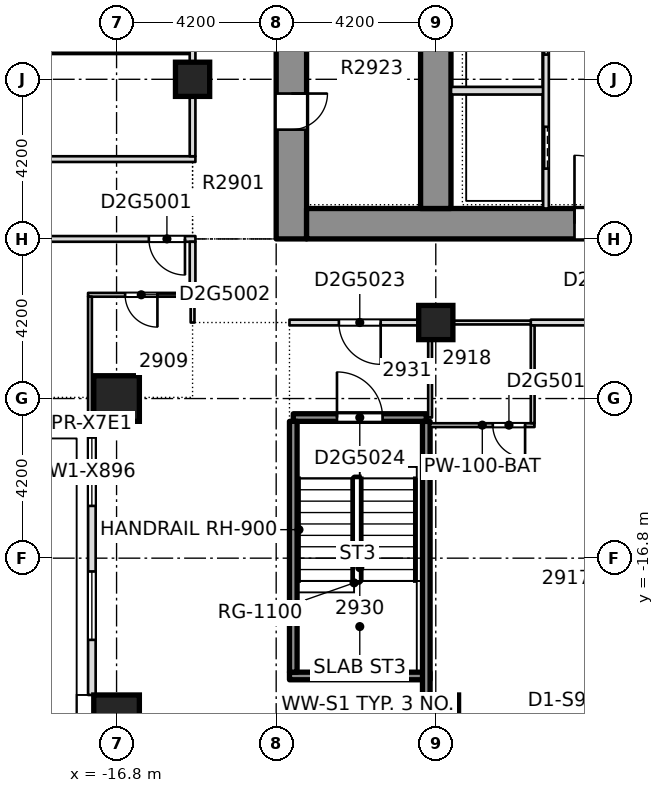
"""IFC4 building model, lengths in metres.
Left out: names, types, materials, properties, quantities, classifications, styles, units other than length and angle.
Written with IfcOpenShell. Run it as: python <this file> out.ifc"""

import sys

from ifc_helpers import new_model, si_unit, direction, frame, frame_2d, origin, origin_2d, place, context, subcontext, project, spatial, rectangle, extrude, element, fill, save


model = new_model("IFC4")
c1 = context("Model", 3, precision=1e-05, world=origin(), true_north=direction((0.0, 1.0)))
c2 = subcontext(c1, "Body", "Model", "MODEL_VIEW")
j1 = project(units=[si_unit("LENGTHUNIT", "METRE"), si_unit("PLANEANGLEUNIT", "RADIAN")], contexts=[c1])
p1 = place(None, origin())
s1 = spatial("IfcSite", under=j1, at=p1, CompositionType="ELEMENT")
p2 = place(p1, origin())
s2 = spatial("IfcBuilding", under=s1, at=p2, CompositionType="ELEMENT")
p3 = place(p2, frame((0.0, 0.0, 114.9)))
s3 = spatial("IfcBuildingStorey", under=s2, at=p3, CompositionType="ELEMENT", Elevation=114.9)
p4 = place(p3, frame((-12.2, -8.4, -0.32), z_axis=(0.0, 0.0, 1.0), x_axis=(0.0, 1.0, 0.0)))
e1 = element("IfcWall", 1, at=p4, inside=s3, PredefinedType="SHEAR", context=c2, shape_type="SweptSolid", body=[
    extrude(rectangle(XDim=30.15, YDim=0.8, at=frame_2d((15.075, 0.0))), origin(), (0.0, 0.0, 1.0), 3.45),
])
p5 = place(p4, frame((2.875, 0.0, 0.32)))
e2 = element("IfcOpeningElement", 2, at=p5, cuts=e1, PredefinedType="OPENING", context=c2, shape_type="SweptSolid", body=[
    extrude(rectangle(XDim=0.95, YDim=2.1, at=frame_2d((0.475, 1.05))), frame((0.0, 0.41, 0.0), z_axis=(0.0, -1.0, 0.0), x_axis=(1.0, 0.0, 0.0)), (0.0, 0.0, 1.0), 0.82),
])
p6 = place(p4, frame((6.575, 0.0, 0.32)))
e3 = element("IfcOpeningElement", 3, at=p6, cuts=e1, PredefinedType="OPENING", context=c2, shape_type="SweptSolid", body=[
    extrude(rectangle(XDim=0.95, YDim=2.1, at=frame_2d((0.475, 1.05))), frame((0.0, 0.41, 0.0), z_axis=(0.0, -1.0, 0.0), x_axis=(1.0, 0.0, 0.0)), (0.0, 0.0, 1.0), 0.82),
])
p7 = place(p4, frame((9.425, 0.0, 0.32)))
e4 = element("IfcOpeningElement", 4, at=p7, cuts=e1, PredefinedType="OPENING", context=c2, shape_type="SweptSolid", body=[
    extrude(rectangle(XDim=0.95, YDim=2.1, at=frame_2d((0.475, 1.05))), frame((0.0, 0.41, 0.0), z_axis=(0.0, -1.0, 0.0), x_axis=(1.0, 0.0, 0.0)), (0.0, 0.0, 1.0), 0.82),
])
p8 = place(p4, frame((13.225, 0.0, 0.32)))
e5 = element("IfcOpeningElement", 5, at=p8, cuts=e1, PredefinedType="OPENING", context=c2, shape_type="SweptSolid", body=[
    extrude(rectangle(XDim=0.95, YDim=2.1, at=frame_2d((0.475, 1.05))), frame((0.0, 0.41, 0.0), z_axis=(0.0, -1.0, 0.0), x_axis=(1.0, 0.0, 0.0)), (0.0, 0.0, 1.0), 0.82),
])
p9 = place(p4, frame((16.775, 0.0, 0.32)))
e6 = element("IfcOpeningElement", 6, at=p9, cuts=e1, PredefinedType="OPENING", context=c2, shape_type="SweptSolid", body=[
    extrude(rectangle(XDim=0.95, YDim=2.1, at=frame_2d((0.475, 1.05))), frame((0.0, 0.41, 0.0), z_axis=(0.0, -1.0, 0.0), x_axis=(1.0, 0.0, 0.0)), (0.0, 0.0, 1.0), 0.82),
])
p10 = place(p4, frame((24.75, 0.0, 0.32)))
e7 = element("IfcOpeningElement", 7, at=p10, cuts=e1, PredefinedType="OPENING", context=c2, shape_type="SweptSolid", body=[
    extrude(rectangle(XDim=0.95, YDim=2.1, at=frame_2d((0.475, 1.05))), frame((0.0, 0.41, 0.0), z_axis=(0.0, -1.0, 0.0), x_axis=(1.0, 0.0, 0.0)), (0.0, 0.0, 1.0), 0.82),
])
p11 = place(p4, frame((19.3, 0.0, 0.32)))
e8 = element("IfcOpeningElement", 8, at=p11, cuts=e1, PredefinedType="OPENING", context=c2, shape_type="SweptSolid", body=[
    extrude(rectangle(XDim=1.2, YDim=2.1, at=frame_2d((0.6, 1.05))), frame((0.0, 0.41, 0.0), z_axis=(0.0, -1.0, 0.0), x_axis=(1.0, 0.0, 0.0)), (0.0, 0.0, 1.0), 0.82),
])
p12 = place(p3, frame((-11.8, -8.0, -0.32), z_axis=(0.0, 0.0, 1.0), x_axis=(1.0, 0.0, 0.0)))
e9 = element("IfcWall", 9, at=p12, inside=s3, PredefinedType="SHEAR", context=c2, shape_type="SweptSolid", body=[
    extrude(rectangle(XDim=23.6, YDim=0.8, at=frame_2d((11.8, 0.0))), origin(), (0.0, 0.0, 1.0), 3.45),
])
p13 = place(p12, frame((7.05, 0.0, 0.32)))
e10 = element("IfcOpeningElement", 10, at=p13, cuts=e9, PredefinedType="OPENING", context=c2, shape_type="SweptSolid", body=[
    extrude(rectangle(XDim=1.8, YDim=2.1, at=frame_2d((0.9, 1.05))), frame((0.0, 0.41, 0.0), z_axis=(0.0, -1.0, 0.0), x_axis=(1.0, 0.0, 0.0)), (0.0, 0.0, 1.0), 0.82),
])
p14 = place(p12, frame((14.75, 0.0, 0.32)))
e11 = element("IfcOpeningElement", 11, at=p14, cuts=e9, PredefinedType="OPENING", context=c2, shape_type="SweptSolid", body=[
    extrude(rectangle(XDim=1.8, YDim=2.1, at=frame_2d((0.9, 1.05))), frame((0.0, 0.41, 0.0), z_axis=(0.0, -1.0, 0.0), x_axis=(1.0, 0.0, 0.0)), (0.0, 0.0, 1.0), 0.82),
])
p15 = place(p3, frame((-8.4, -7.6, -0.32), z_axis=(0.0, 0.0, 1.0), x_axis=(0.0, 1.0, 0.0)))
e12 = element("IfcWall", 12, at=p15, inside=s3, PredefinedType="SHEAR", context=c2, shape_type="SweptSolid", body=[
    extrude(rectangle(XDim=28.55, YDim=0.8, at=frame_2d((14.275, 0.0))), origin(), (0.0, 0.0, 1.0), 3.45),
])
p16 = place(p15, frame((18.5, 0.0, 0.32)))
e13 = element("IfcOpeningElement", 13, at=p16, cuts=e12, PredefinedType="OPENING", context=c2, shape_type="SweptSolid", body=[
    extrude(rectangle(XDim=1.2, YDim=2.1, at=frame_2d((0.6, 1.05))), frame((0.0, 0.41, 0.0), z_axis=(0.0, -1.0, 0.0), x_axis=(1.0, 0.0, 0.0)), (0.0, 0.0, 1.0), 0.82),
])
for number, where, z_axis, x_axis in (
    (14, (-16.8, -21.0, -0.32), (0.0, 0.0, 1.0), (1.0, 0.0, 0.0)),
    (15, (-8.4, -21.0, -0.32), (0.0, 0.0, 1.0), (1.0, 0.0, 0.0)),
    (16, (-16.8, -12.6, -0.32), (0.0, 0.0, 1.0), (1.0, 0.0, 0.0)),
):
    element("IfcColumn", number, at=place(p3, frame(where, z_axis=z_axis, x_axis=x_axis)), inside=s3, PredefinedType="COLUMN", context=c2, shape_type="SweptSolid", body=[
        extrude(rectangle(XDim=1.2, YDim=1.2, at=origin_2d()), origin(), (0.0, 0.0, 1.0), 3.45),
    ])
for number, where, z_axis, x_axis in (
    (17, (-8.4, -10.6, -0.32), (0.0, 0.0, 1.0), (1.0, 0.0, 0.0)),
    (18, (-14.8, -4.2, -0.32), (0.0, 0.0, 1.0), (1.0, 0.0, 0.0)),
):
    element("IfcColumn", number, at=place(p3, frame(where, z_axis=z_axis, x_axis=x_axis)), inside=s3, PredefinedType="COLUMN", context=c2, shape_type="SweptSolid", body=[
        extrude(rectangle(XDim=0.9, YDim=0.9, at=origin_2d()), origin(), (0.0, 0.0, 1.0), 3.45),
    ])
p17 = place(p3, frame((-8.55, -13.3, 0.0), z_axis=(0.0, 0.0, 1.0), x_axis=(1.0, 0.0, 0.0)))
e19 = element("IfcWall", 19, at=p17, inside=s3, PredefinedType="PARTITIONING", context=c2, shape_type="SweptSolid", body=[
    extrude(rectangle(XDim=2.748, YDim=0.1, at=frame_2d((1.374, 0.0))), origin(), (0.0, 0.0, 1.0), 3.13),
])
p18 = place(p17, frame((1.65, 0.0, 0.0)))
e20 = element("IfcOpeningElement", 20, at=p18, cuts=e19, PredefinedType="OPENING", context=c2, shape_type="SweptSolid", body=[
    extrude(rectangle(XDim=0.85, YDim=2.1, at=frame_2d((0.425, 1.05))), frame((0.0, 0.06, 0.0), z_axis=(0.0, -1.0, 0.0), x_axis=(1.0, 0.0, 0.0)), (0.0, 0.0, 1.0), 0.12),
])
p19 = place(p3, frame((-12.15, -13.1, 0.0), z_axis=(0.0, 0.0, 1.0), x_axis=(1.0, 0.0, 0.0)))
e21 = element("IfcWall", 21, at=p19, inside=s3, PredefinedType="SOLIDWALL", context=c2, shape_type="SweptSolid", body=[
    extrude(rectangle(XDim=3.5, YDim=0.2, at=frame_2d((1.75, 0.0))), origin(), (0.0, 0.0, 1.0), 3.13),
])
p20 = place(p19, frame((1.15, 0.0, 0.0)))
e22 = element("IfcOpeningElement", 22, at=p20, cuts=e21, PredefinedType="OPENING", context=c2, shape_type="SweptSolid", body=[
    extrude(rectangle(XDim=1.2, YDim=2.1, at=frame_2d((0.6, 1.05))), frame((0.0, 0.11, 0.0), z_axis=(0.0, -1.0, 0.0), x_axis=(1.0, 0.0, 0.0)), (0.0, 0.0, 1.0), 0.22),
])
p21 = place(p3, frame((-12.25, -10.6, 0.0), z_axis=(0.0, 0.0, 1.0), x_axis=(1.0, 0.0, 0.0)))
e23 = element("IfcWall", 23, at=p21, inside=s3, PredefinedType="PARTITIONING", context=c2, shape_type="SweptSolid", body=[
    extrude(rectangle(XDim=3.75, YDim=0.15, at=frame_2d((1.875, 0.0))), origin(), (0.0, 0.0, 1.0), 3.13),
])
p22 = place(p21, frame((1.3, 0.0, 0.0)))
e24 = element("IfcOpeningElement", 24, at=p22, cuts=e23, PredefinedType="OPENING", context=c2, shape_type="SweptSolid", body=[
    extrude(rectangle(XDim=1.1, YDim=2.1, at=frame_2d((0.55, 1.05))), frame((0.0, 0.085, 0.0), z_axis=(0.0, -1.0, 0.0), x_axis=(1.0, 0.0, 0.0)), (0.0, 0.0, 1.0), 0.17),
])
p23 = place(p3, frame((-8.6, -10.6, 0.0), z_axis=(0.0, 0.0, 1.0), x_axis=(1.0, 0.0, 0.0)))
e25 = element("IfcWall", 25, at=p23, inside=s3, PredefinedType="PARTITIONING", context=c2, shape_type="SweptSolid", body=[
    extrude(rectangle(XDim=2.8, YDim=0.1, at=frame_2d((1.4, 0.0))), origin(), (0.0, 0.0, 1.0), 3.13),
])
p24 = place(p3, frame((-5.9, -10.6, 0.0), z_axis=(0.0, 0.0, 1.0), x_axis=(1.0, 0.0, 0.0)))
e26 = element("IfcWall", 26, at=p24, inside=s3, PredefinedType="PARTITIONING", context=c2, shape_type="SweptSolid", body=[
    extrude(rectangle(XDim=7.8, YDim=0.15, at=frame_2d((3.9, 0.0))), origin(), (0.0, 0.0, 1.0), 3.13),
])
p25 = place(p24, frame((1.575, 0.0, 0.0)))
e27 = element("IfcOpeningElement", 27, at=p25, cuts=e26, PredefinedType="OPENING", context=c2, shape_type="SweptSolid", body=[
    extrude(rectangle(XDim=0.95, YDim=2.1, at=frame_2d((0.475, 1.05))), frame((0.0, 0.085, 0.0), z_axis=(0.0, -1.0, 0.0), x_axis=(1.0, 0.0, 0.0)), (0.0, 0.0, 1.0), 0.17),
])
p26 = place(p24, frame((6.45, 0.0, 0.0)))
e28 = element("IfcOpeningElement", 28, at=p26, cuts=e26, PredefinedType="OPENING", context=c2, shape_type="SweptSolid", body=[
    extrude(rectangle(XDim=1.1, YDim=2.1, at=frame_2d((0.55, 1.05))), frame((0.0, 0.085, 0.0), z_axis=(0.0, -1.0, 0.0), x_axis=(1.0, 0.0, 0.0)), (0.0, 0.0, 1.0), 0.17),
])
p27 = place(p3, frame((-17.55, -9.87, 0.0), z_axis=(0.0, 0.0, 1.0), x_axis=(1.0, 0.0, 0.0)))
e29 = element("IfcWall", 29, at=p27, inside=s3, PredefinedType="PARTITIONING", context=c2, shape_type="SweptSolid", body=[
    extrude(rectangle(XDim=2.825, YDim=0.1, at=frame_2d((1.413, 0.0))), origin(), (0.0, 0.0, 1.0), 3.13),
])
p28 = place(p27, frame((0.975, 0.0, 0.0)))
e30 = element("IfcOpeningElement", 30, at=p28, cuts=e29, PredefinedType="OPENING", context=c2, shape_type="SweptSolid", body=[
    extrude(rectangle(XDim=0.85, YDim=2.1, at=frame_2d((0.425, 1.05))), frame((0.0, 0.06, 0.0), z_axis=(0.0, -1.0, 0.0), x_axis=(1.0, 0.0, 0.0)), (0.0, 0.0, 1.0), 0.12),
])
p29 = place(p3, frame((-25.75, -8.4, 0.0), z_axis=(0.0, 0.0, 1.0), x_axis=(1.0, 0.0, 0.0)))
e31 = element("IfcWall", 31, at=p29, inside=s3, PredefinedType="PARTITIONING", context=c2, shape_type="SweptSolid", body=[
    extrude(rectangle(XDim=11.025, YDim=0.15, at=frame_2d((5.512, 0.0))), origin(), (0.0, 0.0, 1.0), 3.13),
])
p30 = place(p29, frame((9.8, 0.0, 0.0)))
e32 = element("IfcOpeningElement", 32, at=p30, cuts=e31, PredefinedType="OPENING", context=c2, shape_type="SweptSolid", body=[
    extrude(rectangle(XDim=0.95, YDim=2.1, at=frame_2d((0.475, 1.05))), frame((0.0, 0.085, 0.0), z_axis=(0.0, -1.0, 0.0), x_axis=(1.0, 0.0, 0.0)), (0.0, 0.0, 1.0), 0.17),
])
p31 = place(p3, frame((-25.75, -6.3, 0.0), z_axis=(0.0, 0.0, 1.0), x_axis=(1.0, 0.0, 0.0)))
e33 = element("IfcWall", 33, at=p31, inside=s3, PredefinedType="PARTITIONING", context=c2, shape_type="SweptSolid", body=[
    extrude(rectangle(XDim=11.025, YDim=0.15, at=frame_2d((5.512, 0.0))), origin(), (0.0, 0.0, 1.0), 3.13),
])
p32 = place(p31, frame((4.875, 0.0, 0.0)))
e34 = element("IfcOpeningElement", 34, at=p32, cuts=e33, PredefinedType="OPENING", context=c2, shape_type="SweptSolid", body=[
    extrude(rectangle(XDim=1.0, YDim=2.1, at=frame_2d((0.5, 1.05))), frame((0.0, 0.085, 0.0), z_axis=(0.0, -1.0, 0.0), x_axis=(1.0, 0.0, 0.0)), (0.0, 0.0, 1.0), 0.17),
])
p33 = place(p3, frame((-17.5, -13.35, 0.0), z_axis=(0.0, 0.0, 1.0), x_axis=(0.0, 1.0, 0.0)))
e35 = element("IfcWall", 35, at=p33, inside=s3, PredefinedType="PARTITIONING", context=c2, shape_type="SweptSolid", body=[
    extrude(rectangle(XDim=3.43, YDim=0.1, at=frame_2d((1.715, 0.0))), origin(), (0.0, 0.0, 1.0), 3.13),
])
p34 = place(p3, frame((-14.8, -10.6, 0.0), z_axis=(0.0, 0.0, 1.0), x_axis=(0.0, 1.0, 0.0)))
e36 = element("IfcWall", 36, at=p34, inside=s3, PredefinedType="PARTITIONING", context=c2, shape_type="SweptSolid", body=[
    extrude(rectangle(XDim=0.68, YDim=0.1, at=frame_2d((0.34, 0.0))), origin(), (0.0, 0.0, 1.0), 3.13),
])
p35 = place(p3, frame((-14.8, -9.82, 0.0), z_axis=(0.0, 0.0, 1.0), x_axis=(0.0, 1.0, 0.0)))
e37 = element("IfcWall", 37, at=p35, inside=s3, PredefinedType="PARTITIONING", context=c2, shape_type="SweptSolid", body=[
    extrude(rectangle(XDim=1.345, YDim=0.15, at=frame_2d((0.672, 0.0))), origin(), (0.0, 0.0, 1.0), 3.13),
])
p36 = place(p3, frame((-14.8, -6.225, 0.0), z_axis=(0.0, 0.0, 1.0), x_axis=(0.0, 1.0, 0.0)))
e38 = element("IfcWall", 38, at=p36, inside=s3, PredefinedType="PARTITIONING", context=c2, shape_type="SweptSolid", body=[
    extrude(rectangle(XDim=18.75, YDim=0.15, at=frame_2d((9.375, 0.0))), origin(), (0.0, 0.0, 1.0), 3.13),
])
p37 = place(p36, frame((13.725, 0.0, 0.0)))
e39 = element("IfcOpeningElement", 39, at=p37, cuts=e38, PredefinedType="OPENING", context=c2, shape_type="SweptSolid", body=[
    extrude(rectangle(XDim=1.0, YDim=2.1, at=frame_2d((0.5, 1.05))), frame((0.0, 0.085, 0.0), z_axis=(0.0, -1.0, 0.0), x_axis=(1.0, 0.0, 0.0)), (0.0, 0.0, 1.0), 0.17),
])
p38 = place(p36, frame((5.675, 0.0, 0.0)))
e40 = element("IfcOpeningElement", 40, at=p38, cuts=e38, PredefinedType="OPENING", context=c2, shape_type="SweptSolid", body=[
    extrude(rectangle(XDim=1.1, YDim=2.1, at=frame_2d((0.55, 1.05))), frame((0.0, 0.085, 0.0), z_axis=(0.0, -1.0, 0.0), x_axis=(1.0, 0.0, 0.0)), (0.0, 0.0, 1.0), 0.17),
])
p39 = place(p3, frame((-8.55, -13.1, 0.0), z_axis=(0.0, 0.0, 1.0), x_axis=(0.0, 1.0, 0.0)))
e41 = element("IfcWall", 41, at=p39, inside=s3, PredefinedType="PARTITIONING", context=c2, shape_type="SweptSolid", body=[
    extrude(rectangle(XDim=2.425, YDim=0.1, at=frame_2d((1.212, 0.0))), origin(), (0.0, 0.0, 1.0), 3.13),
])
p40 = place(p3, frame((-5.85, -13.248, 0.0), z_axis=(0.0, 0.0, 1.0), x_axis=(0.0, 1.0, 0.0)))
e42 = element("IfcWall", 42, at=p40, inside=s3, PredefinedType="PARTITIONING", context=c2, shape_type="SweptSolid", body=[
    extrude(rectangle(XDim=2.573, YDim=0.1, at=frame_2d((1.287, 0.0))), origin(), (0.0, 0.0, 1.0), 3.13),
])
p41 = place(p3, frame((-24.6, -13.25, 0.0), z_axis=(0.0, 0.0, 1.0), x_axis=(1.0, 0.0, 0.0)))
e43 = element("IfcWall", 43, at=p41, inside=s3, PredefinedType="STANDARD", context=c2, shape_type="SweptSolid", body=[
    extrude(rectangle(XDim=7.05, YDim=0.2, at=frame_2d((3.525, 0.0))), origin(), (0.0, 0.0, 1.0), 3.13),
])
p42 = place(p3, frame((-17.45, -13.35, 0.0), z_axis=(0.0, 0.0, 1.0), x_axis=(0.0, -1.0, 0.0)))
e44 = element("IfcWall", 44, at=p42, inside=s3, PredefinedType="STANDARD", context=c2, shape_type="SweptSolid", body=[
    extrude(rectangle(XDim=7.05, YDim=0.2, at=frame_2d((3.525, 0.0))), origin(), (0.0, 0.0, 1.0), 3.13),
])
p43 = place(p42, frame((3.8, 0.0, 0.2)))
e45 = element("IfcOpeningElement", 45, at=p43, cuts=e44, PredefinedType="OPENING", context=c2, shape_type="SweptSolid", body=[
    extrude(rectangle(XDim=1.8, YDim=2.65, at=frame_2d((0.9, 1.325))), frame((0.0, 0.11, 0.0), z_axis=(0.0, -1.0, 0.0), x_axis=(1.0, 0.0, 0.0)), (0.0, 0.0, 1.0), 0.22),
])
p44 = place(p42, frame((0.275, 0.0, 0.2)))
e46 = element("IfcOpeningElement", 46, at=p44, cuts=e44, PredefinedType="OPENING", context=c2, shape_type="SweptSolid", body=[
    extrude(rectangle(XDim=1.8, YDim=2.65, at=frame_2d((0.9, 1.325))), frame((0.0, 0.11, 0.0), z_axis=(0.0, -1.0, 0.0), x_axis=(1.0, 0.0, 0.0)), (0.0, 0.0, 1.0), 0.22),
])
p45 = place(p3, frame((-7.999, -4.5, 0.0), z_axis=(0.0, 0.0, 1.0), x_axis=(1.0, 0.0, 0.0)))
e47 = element("IfcWall", 47, at=p45, inside=s3, PredefinedType="PARTITIONING", context=c2, shape_type="SweptSolid", body=[
    extrude(rectangle(XDim=2.424, YDim=0.2, at=frame_2d((1.212, 0.0))), origin(), (0.0, 0.0, 1.0), 3.13),
])
p46 = place(p3, frame((-5.5, -7.599, 0.0), z_axis=(0.0, 0.0, 1.0), x_axis=(0.0, 1.0, 0.0)))
e48 = element("IfcWall", 48, at=p46, inside=s3, PredefinedType="PARTITIONING", context=c2, shape_type="SweptSolid", body=[
    extrude(rectangle(XDim=12.024, YDim=0.15, at=frame_2d((6.012, 0.0))), origin(), (0.0, 0.0, 1.0), 3.13),
])
p47 = place(p46, frame((1.049, 0.0, 0.0)))
e49 = element("IfcOpeningElement", 49, at=p47, cuts=e48, PredefinedType="OPENING", context=c2, shape_type="SweptSolid", body=[
    extrude(rectangle(XDim=1.1, YDim=2.1, at=frame_2d((0.55, 1.05))), frame((0.0, 0.085, 0.0), z_axis=(0.0, -1.0, 0.0), x_axis=(1.0, 0.0, 0.0)), (0.0, 0.0, 1.0), 0.17),
])
p48 = place(p46, frame((4.049, 0.0, 0.0)))
e50 = element("IfcOpeningElement", 50, at=p48, cuts=e48, PredefinedType="OPENING", context=c2, shape_type="SweptSolid", body=[
    extrude(rectangle(XDim=1.1, YDim=2.1, at=frame_2d((0.55, 1.05))), frame((0.0, 0.085, 0.0), z_axis=(0.0, -1.0, 0.0), x_axis=(1.0, 0.0, 0.0)), (0.0, 0.0, 1.0), 0.17),
])
p49 = place(p46, frame((7.049, 0.0, 0.0)))
e51 = element("IfcOpeningElement", 51, at=p49, cuts=e48, PredefinedType="OPENING", context=c2, shape_type="SweptSolid", body=[
    extrude(rectangle(XDim=1.1, YDim=2.1, at=frame_2d((0.55, 1.05))), frame((0.0, 0.085, 0.0), z_axis=(0.0, -1.0, 0.0), x_axis=(1.0, 0.0, 0.0)), (0.0, 0.0, 1.0), 0.17),
])
p50 = place(p46, frame((10.049, 0.0, 0.0)))
e52 = element("IfcOpeningElement", 52, at=p50, cuts=e48, PredefinedType="OPENING", context=c2, shape_type="SweptSolid", body=[
    extrude(rectangle(XDim=1.1, YDim=2.1, at=frame_2d((0.55, 1.05))), frame((0.0, 0.085, 0.0), z_axis=(0.0, -1.0, 0.0), x_axis=(1.0, 0.0, 0.0)), (0.0, 0.0, 1.0), 0.17),
])
p51 = place(p3, frame((-12.25, -19.9, 0.0), z_axis=(0.0, 0.0, 1.0), x_axis=(1.0, 0.0, 0.0)))
e53 = element("IfcWall", 53, at=p51, inside=s3, PredefinedType="SOLIDWALL", context=c2, shape_type="SweptSolid", body=[
    extrude(rectangle(XDim=3.7, YDim=0.2, at=frame_2d((1.85, 0.0))), origin(), (0.0, 0.0, 1.0), 3.13),
])
p52 = place(p3, frame((-12.15, -19.8, 0.0), z_axis=(0.0, 0.0, 1.0), x_axis=(0.0, 1.0, 0.0)))
e54 = element("IfcWall", 54, at=p52, inside=s3, PredefinedType="SOLIDWALL", context=c2, shape_type="SweptSolid", body=[
    extrude(rectangle(XDim=6.6, YDim=0.2, at=frame_2d((3.3, 0.0))), origin(), (0.0, 0.0, 1.0), 3.13),
])
p53 = place(p3, frame((-8.65, -20.4, 0.0), z_axis=(0.0, 0.0, 1.0), x_axis=(0.0, 1.0, 0.0)))
e55 = element("IfcWall", 55, at=p53, inside=s3, PredefinedType="SOLIDWALL", context=c2, shape_type="SweptSolid", body=[
    extrude(rectangle(XDim=7.198, YDim=0.2, at=frame_2d((3.599, 0.0))), origin(), (0.0, 0.0, 1.0), 3.13),
])
p54 = place(p30, origin())
e56 = element("IfcDoor", 56, at=p54, inside=s3, OperationType="SINGLE_SWING_RIGHT", PredefinedType="DOOR", context=c2, shape_type="SweptSolid", body=[
    extrude(rectangle(XDim=0.95, YDim=2.1, at=frame_2d((0.475, 1.05))), frame((0.0, 0.025, 0.0), z_axis=(0.0, -1.0, 0.0), x_axis=(1.0, 0.0, 0.0)), (0.0, 0.0, 1.0), 0.05),
])
fill(e32, e56)
p55 = place(p28, origin())
e57 = element("IfcDoor", 57, at=p55, inside=s3, OperationType="SINGLE_SWING_RIGHT", PredefinedType="DOOR", context=c2, shape_type="SweptSolid", body=[
    extrude(rectangle(XDim=0.85, YDim=2.1, at=frame_2d((0.425, 1.05))), frame((0.0, 0.025, 0.0), z_axis=(0.0, -1.0, 0.0), x_axis=(1.0, 0.0, 0.0)), (0.0, 0.0, 1.0), 0.05),
])
fill(e30, e57)
p56 = place(p18, origin())
e58 = element("IfcDoor", 58, at=p56, inside=s3, OperationType="SINGLE_SWING_RIGHT", PredefinedType="DOOR", context=c2, shape_type="SweptSolid", body=[
    extrude(rectangle(XDim=0.85, YDim=2.1, at=frame_2d((0.425, 1.05))), frame((0.0, 0.025, 0.0), z_axis=(0.0, -1.0, 0.0), x_axis=(1.0, 0.0, 0.0)), (0.0, 0.0, 1.0), 0.05),
])
fill(e20, e58)
p57 = place(p22, origin())
e59 = element("IfcDoor", 59, at=p57, inside=s3, OperationType="SINGLE_SWING_RIGHT", PredefinedType="DOOR", context=c2, shape_type="SweptSolid", body=[
    extrude(rectangle(XDim=1.1, YDim=2.1, at=frame_2d((0.55, 1.05))), frame((0.0, 0.025, 0.0), z_axis=(0.0, -1.0, 0.0), x_axis=(1.0, 0.0, 0.0)), (0.0, 0.0, 1.0), 0.05),
])
fill(e24, e59)
p58 = place(p20, origin())
e60 = element("IfcDoor", 60, at=p58, inside=s3, OperationType="SINGLE_SWING_RIGHT", PredefinedType="DOOR", context=c2, shape_type="SweptSolid", body=[
    extrude(rectangle(XDim=1.2, YDim=2.1, at=frame_2d((0.6, 1.05))), frame((0.0, 0.025, 0.0), z_axis=(0.0, -1.0, 0.0), x_axis=(1.0, 0.0, 0.0)), (0.0, 0.0, 1.0), 0.05),
])
fill(e22, e60)
p59 = place(p43, origin())
e61 = element("IfcWindow", 61, at=p59, inside=s3, PartitioningType="SINGLE_PANEL", PredefinedType="WINDOW", context=c2, shape_type="SweptSolid", body=[
    extrude(rectangle(XDim=1.8, YDim=2.65, at=frame_2d((0.9, 1.325))), frame((0.0, 0.03, 0.0), z_axis=(0.0, -1.0, 0.0), x_axis=(1.0, 0.0, 0.0)), (0.0, 0.0, 1.0), 0.06),
])
fill(e45, e61)
p60 = place(p44, origin())
e62 = element("IfcWindow", 62, at=p60, inside=s3, PartitioningType="SINGLE_PANEL", PredefinedType="WINDOW", context=c2, shape_type="SweptSolid", body=[
    extrude(rectangle(XDim=1.8, YDim=2.65, at=frame_2d((0.9, 1.325))), frame((0.0, 0.03, 0.0), z_axis=(0.0, -1.0, 0.0), x_axis=(1.0, 0.0, 0.0)), (0.0, 0.0, 1.0), 0.06),
])
fill(e46, e62)
p61 = place(p47, origin())
e63 = element("IfcDoor", 63, at=p61, inside=s3, OperationType="SLIDING_TO_LEFT", PredefinedType="DOOR", context=c2, shape_type="SweptSolid", body=[
    extrude(rectangle(XDim=1.1, YDim=2.1, at=frame_2d((0.55, 1.05))), frame((0.0, 0.025, 0.0), z_axis=(0.0, -1.0, 0.0), x_axis=(1.0, 0.0, 0.0)), (0.0, 0.0, 1.0), 0.05),
])
fill(e49, e63)
p62 = place(p48, origin())
e64 = element("IfcDoor", 64, at=p62, inside=s3, OperationType="SLIDING_TO_LEFT", PredefinedType="DOOR", context=c2, shape_type="SweptSolid", body=[
    extrude(rectangle(XDim=1.1, YDim=2.1, at=frame_2d((0.55, 1.05))), frame((0.0, 0.025, 0.0), z_axis=(0.0, -1.0, 0.0), x_axis=(1.0, 0.0, 0.0)), (0.0, 0.0, 1.0), 0.05),
])
fill(e50, e64)
p63 = place(p13, origin())
e65 = element("IfcDoor", 65, at=p63, inside=s3, OperationType="SINGLE_SWING_LEFT", PredefinedType="DOOR", context=c2, shape_type="SweptSolid", body=[
    extrude(rectangle(XDim=1.8, YDim=2.1, at=frame_2d((0.9, 1.05))), frame((0.0, 0.025, 0.0), z_axis=(0.0, -1.0, 0.0), x_axis=(1.0, 0.0, 0.0)), (0.0, 0.0, 1.0), 0.05),
])
fill(e10, e65)
p64 = place(p5, origin())
e66 = element("IfcDoor", 66, at=p64, inside=s3, OperationType="SINGLE_SWING_LEFT", PredefinedType="DOOR", context=c2, shape_type="SweptSolid", body=[
    extrude(rectangle(XDim=0.95, YDim=2.1, at=frame_2d((0.475, 1.05))), frame((0.0, 0.025, 0.0), z_axis=(0.0, -1.0, 0.0), x_axis=(1.0, 0.0, 0.0)), (0.0, 0.0, 1.0), 0.05),
])
fill(e2, e66)
save(model, sys.argv[1])
